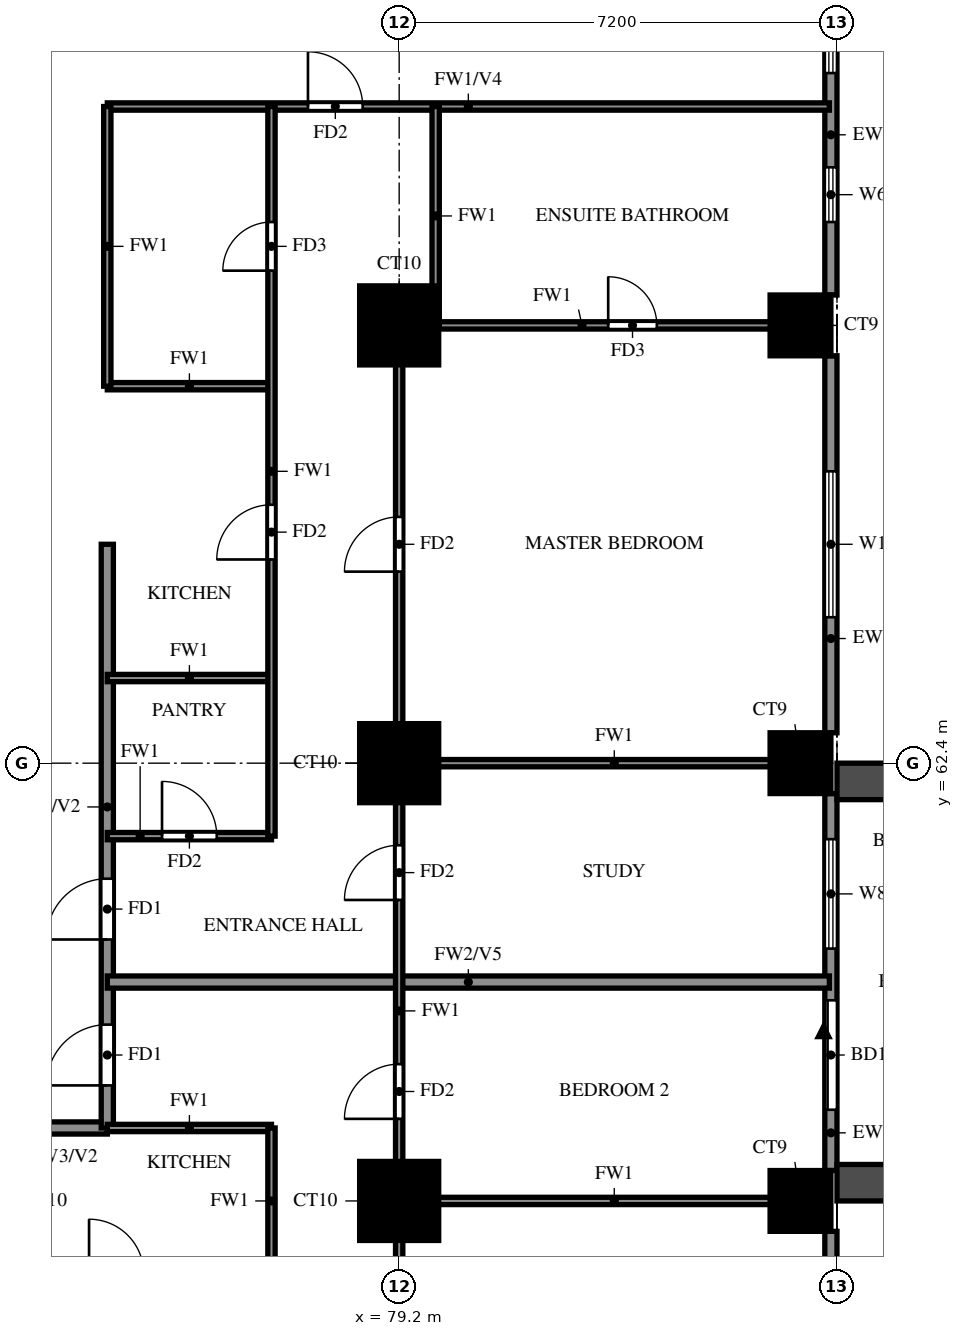
"""IFC4 building model, lengths in metres.
Left out: names, types, materials, properties, quantities, classifications, styles, units other than length and angle.
Written with IfcOpenShell. Run it as: python <this file> out.ifc"""

import sys

from ifc_helpers import new_model, si_unit, direction, frame, frame_2d, origin, origin_2d, place, context, subcontext, project, spatial, rectangle, extrude, source, transform, mapped, element, fill, save


model = new_model("IFC4")
c1 = context("Model", 3, precision=1e-05, world=origin(), true_north=direction((0.0, 1.0)))
c2 = subcontext(c1, "Body", "Model", "MODEL_VIEW")
j1 = project(units=[si_unit("LENGTHUNIT", "METRE"), si_unit("PLANEANGLEUNIT", "RADIAN")], contexts=[c1])
p1 = place(None, origin())
s1 = spatial("IfcSite", under=j1, at=p1, CompositionType="ELEMENT")
p2 = place(p1, origin())
s2 = spatial("IfcBuilding", under=s1, at=p2, CompositionType="ELEMENT")
p3 = place(p2, frame((0.0, 0.0, 86.5)))
s3 = spatial("IfcBuildingStorey", under=s2, at=p3, CompositionType="ELEMENT", Elevation=86.5)
m1 = source(origin(), c2, "Body", "SweptSolid", [
    extrude(rectangle(XDim=1.3, YDim=1.3, at=origin_2d()), origin(), (0.0, 0.0, 1.0), 3.18),
])
p4 = place(p3, frame((79.2, 55.2, 0.0), z_axis=(0.0, 0.0, 1.0), x_axis=(1.0, 0.0, 0.0)))
e1 = element("IfcColumn", 1, at=p4, inside=s3, PredefinedType="COLUMN", context=c2, shape_type="MappedRepresentation", body=[
    mapped(m1, transform((0.0, 0.0, 0.0))),
])
m2 = source(origin(), c2, "Body", "SweptSolid", [
    extrude(rectangle(XDim=1.0, YDim=1.0, at=origin_2d()), origin(), (0.0, 0.0, 1.0), 3.18),
])
p5 = place(p3, frame((85.8, 55.2, 0.0), z_axis=(0.0, 0.0, 1.0), x_axis=(1.0, 0.0, 0.0)))
e2 = element("IfcColumn", 2, at=p5, inside=s3, PredefinedType="COLUMN", context=c2, shape_type="MappedRepresentation", body=[
    mapped(m2, transform((0.0, 0.0, 0.0))),
])
p6 = place(p3, frame((79.2, 62.4, 0.0), z_axis=(0.0, 0.0, 1.0), x_axis=(1.0, 0.0, 0.0)))
e3 = element("IfcColumn", 3, at=p6, inside=s3, PredefinedType="COLUMN", context=c2, shape_type="MappedRepresentation", body=[
    mapped(m1, transform((0.0, 0.0, 0.0))),
])
p7 = place(p3, frame((85.8, 62.4, 0.0), z_axis=(0.0, 0.0, 1.0), x_axis=(1.0, 0.0, 0.0)))
e4 = element("IfcColumn", 4, at=p7, inside=s3, PredefinedType="COLUMN", context=c2, shape_type="MappedRepresentation", body=[
    mapped(m2, transform((0.0, 0.0, 0.0))),
])
p8 = place(p3, frame((79.2, 69.6, 0.0), z_axis=(0.0, 0.0, 1.0), x_axis=(1.0, 0.0, 0.0)))
e5 = element("IfcColumn", 5, at=p8, inside=s3, PredefinedType="COLUMN", context=c2, shape_type="MappedRepresentation", body=[
    mapped(m1, transform((0.0, 0.0, 0.0))),
])
p9 = place(p3, frame((85.8, 69.6, 0.0), z_axis=(0.0, 0.0, 1.0), x_axis=(1.0, 0.0, 0.0)))
e6 = element("IfcColumn", 6, at=p9, inside=s3, PredefinedType="COLUMN", context=c2, shape_type="MappedRepresentation", body=[
    mapped(m2, transform((0.0, 0.0, 0.0))),
])
p10 = place(p3, frame((86.3, 48.5, 0.0), z_axis=(0.0, 0.0, 1.0), x_axis=(0.0, 1.0, 0.0)))
e7 = element("IfcWall", 7, at=p10, inside=s3, PredefinedType="SOLIDWALL", context=c2, shape_type="SweptSolid", body=[
    extrude(rectangle(XDim=6.2, YDim=0.2, at=frame_2d((3.1, 0.0))), origin(), (0.0, 0.0, 1.0), 3.18),
])
p11 = place(p10, frame((1.9, 0.0, 0.6)))
e8 = element("IfcOpeningElement", 8, at=p11, cuts=e7, PredefinedType="OPENING", context=c2, shape_type="SweptSolid", body=[
    extrude(rectangle(XDim=2.4, YDim=2.4, at=frame_2d((1.2, 1.2))), frame((0.0, 0.11, 0.0), z_axis=(0.0, -1.0, 0.0), x_axis=(1.0, 0.0, 0.0)), (0.0, 0.0, 1.0), 0.22),
])
p12 = place(p3, frame((86.3, 55.7, 0.0), z_axis=(0.0, 0.0, 1.0), x_axis=(0.0, 1.0, 0.0)))
e9 = element("IfcWall", 9, at=p12, inside=s3, PredefinedType="SOLIDWALL", context=c2, shape_type="SweptSolid", body=[
    extrude(rectangle(XDim=6.2, YDim=0.2, at=frame_2d((3.1, 0.0))), origin(), (0.0, 0.0, 1.0), 3.18),
])
p13 = place(p12, frame((1.0, 0.0, 0.0)))
e10 = element("IfcOpeningElement", 10, at=p13, cuts=e9, PredefinedType="OPENING", context=c2, shape_type="SweptSolid", body=[
    extrude(rectangle(XDim=1.8, YDim=2.4, at=frame_2d((0.9, 1.2))), frame((0.0, 0.11, 0.0), z_axis=(0.0, -1.0, 0.0), x_axis=(1.0, 0.0, 0.0)), (0.0, 0.0, 1.0), 0.22),
])
p14 = place(p12, frame((3.65, 0.0, 0.6)))
e11 = element("IfcOpeningElement", 11, at=p14, cuts=e9, PredefinedType="OPENING", context=c2, shape_type="SweptSolid", body=[
    extrude(rectangle(XDim=1.8, YDim=2.4, at=frame_2d((0.9, 1.2))), frame((0.0, 0.11, 0.0), z_axis=(0.0, -1.0, 0.0), x_axis=(1.0, 0.0, 0.0)), (0.0, 0.0, 1.0), 0.22),
])
p15 = place(p3, frame((86.3, 62.9, 0.0), z_axis=(0.0, 0.0, 1.0), x_axis=(0.0, 1.0, 0.0)))
e12 = element("IfcWall", 12, at=p15, inside=s3, PredefinedType="SOLIDWALL", context=c2, shape_type="SweptSolid", body=[
    extrude(rectangle(XDim=6.2, YDim=0.2, at=frame_2d((3.1, 0.0))), origin(), (0.0, 0.0, 1.0), 3.18),
])
p16 = place(p15, frame((1.9, 0.0, 0.6)))
e13 = element("IfcOpeningElement", 13, at=p16, cuts=e12, PredefinedType="OPENING", context=c2, shape_type="SweptSolid", body=[
    extrude(rectangle(XDim=2.4, YDim=2.4, at=frame_2d((1.2, 1.2))), frame((0.0, 0.11, 0.0), z_axis=(0.0, -1.0, 0.0), x_axis=(1.0, 0.0, 0.0)), (0.0, 0.0, 1.0), 0.22),
])
p17 = place(p3, frame((86.3, 70.1, 0.0), z_axis=(0.0, 0.0, 1.0), x_axis=(0.0, 1.0, 0.0)))
e14 = element("IfcWall", 14, at=p17, inside=s3, PredefinedType="SOLIDWALL", context=c2, shape_type="SweptSolid", body=[
    extrude(rectangle(XDim=6.2, YDim=0.2, at=frame_2d((3.1, 0.0))), origin(), (0.0, 0.0, 1.0), 3.18),
])
p18 = place(p17, frame((1.2, 0.0, 1.5)))
e15 = element("IfcOpeningElement", 15, at=p18, cuts=e14, PredefinedType="OPENING", context=c2, shape_type="SweptSolid", body=[
    extrude(rectangle(XDim=0.9, YDim=0.9, at=frame_2d((0.45, 0.45))), frame((0.0, 0.11, 0.0), z_axis=(0.0, -1.0, 0.0), x_axis=(1.0, 0.0, 0.0)), (0.0, 0.0, 1.0), 0.22),
])
p19 = place(p17, frame((3.65, 0.0, 0.6)))
e16 = element("IfcOpeningElement", 16, at=p19, cuts=e14, PredefinedType="OPENING", context=c2, shape_type="SweptSolid", body=[
    extrude(rectangle(XDim=1.8, YDim=2.4, at=frame_2d((0.9, 1.2))), frame((0.0, 0.11, 0.0), z_axis=(0.0, -1.0, 0.0), x_axis=(1.0, 0.0, 0.0)), (0.0, 0.0, 1.0), 0.22),
])
for number, where, z_axis, x_axis in (
    (17, (86.4, 55.5, 0.0), (0.0, 0.0, 1.0), (1.0, 0.0, 0.0)),
    (18, (86.4, 62.1, 0.0), (0.0, 0.0, 1.0), (1.0, 0.0, 0.0)),
):
    element("IfcWall", number, at=place(p3, frame(where, z_axis=z_axis, x_axis=x_axis)), inside=s3, PredefinedType="SOLIDWALL", context=c2, shape_type="SweptSolid", body=[
        extrude(rectangle(XDim=2.7, YDim=0.6, at=frame_2d((1.35, 0.0))), origin(), (0.0, 0.0, 1.0), 2.85),
    ])
p20 = place(p3, frame((72.0, 56.4, 0.0), z_axis=(0.0, 0.0, 1.0), x_axis=(1.0, 0.0, 0.0)))
e19 = element("IfcWall", 19, at=p20, inside=s3, PredefinedType="SOLIDWALL", context=c2, shape_type="SweptSolid", body=[
    extrude(rectangle(XDim=2.4, YDim=0.2, at=frame_2d((1.2, 0.0))), origin(), (0.0, 0.0, 1.0), 3.18),
])
p21 = place(p3, frame((74.4, 56.4, 0.0), z_axis=(0.0, 0.0, 1.0), x_axis=(0.0, 1.0, 0.0)))
e20 = element("IfcWall", 20, at=p21, inside=s3, PredefinedType="SOLIDWALL", context=c2, shape_type="SweptSolid", body=[
    extrude(rectangle(XDim=9.6, YDim=0.2, at=frame_2d((4.8, 0.0))), origin(), (0.0, 0.0, 1.0), 3.18),
])
p22 = place(p21, frame((0.7, 0.0, 0.0)))
e21 = element("IfcOpeningElement", 21, at=p22, cuts=e20, PredefinedType="OPENING", context=c2, shape_type="SweptSolid", body=[
    extrude(rectangle(XDim=1.0, YDim=2.1, at=frame_2d((0.5, 1.05))), frame((0.0, 0.11, 0.0), z_axis=(0.0, -1.0, 0.0), x_axis=(1.0, 0.0, 0.0)), (0.0, 0.0, 1.0), 0.22),
])
p23 = place(p21, frame((3.1, 0.0, 0.0)))
e22 = element("IfcOpeningElement", 22, at=p23, cuts=e20, PredefinedType="OPENING", context=c2, shape_type="SweptSolid", body=[
    extrude(rectangle(XDim=1.0, YDim=2.1, at=frame_2d((0.5, 1.05))), frame((0.0, 0.11, 0.0), z_axis=(0.0, -1.0, 0.0), x_axis=(1.0, 0.0, 0.0)), (0.0, 0.0, 1.0), 0.22),
])
p24 = place(p3, frame((74.4, 58.8, 0.0), z_axis=(0.0, 0.0, 1.0), x_axis=(1.0, 0.0, 0.0)))
e23 = element("IfcWall", 23, at=p24, inside=s3, PredefinedType="SOLIDWALL", context=c2, shape_type="SweptSolid", body=[
    extrude(rectangle(XDim=11.875, YDim=0.2, at=frame_2d((5.938, 0.0))), origin(), (0.0, 0.0, 1.0), 2.28),
])
p25 = place(p3, frame((79.2, 55.2, 0.0), z_axis=(0.0, 0.0, 1.0), x_axis=(1.0, 0.0, 0.0)))
e24 = element("IfcWall", 24, at=p25, inside=s3, PredefinedType="PARTITIONING", context=c2, shape_type="SweptSolid", body=[
    extrude(rectangle(XDim=7.075, YDim=0.12, at=frame_2d((3.538, 0.0))), origin(), (0.0, 0.0, 1.0), 3.18),
])
p26 = place(p3, frame((74.4, 56.4, 0.0), z_axis=(0.0, 0.0, 1.0), x_axis=(1.0, 0.0, 0.0)))
e25 = element("IfcWall", 25, at=p26, inside=s3, PredefinedType="PARTITIONING", context=c2, shape_type="SweptSolid", body=[
    extrude(rectangle(XDim=2.7, YDim=0.12, at=frame_2d((1.35, 0.0))), origin(), (0.0, 0.0, 1.0), 3.18),
])
p27 = place(p3, frame((74.4, 61.2, 0.0), z_axis=(0.0, 0.0, 1.0), x_axis=(1.0, 0.0, 0.0)))
e26 = element("IfcWall", 26, at=p27, inside=s3, PredefinedType="PARTITIONING", context=c2, shape_type="SweptSolid", body=[
    extrude(rectangle(XDim=2.7, YDim=0.12, at=frame_2d((1.35, 0.0))), origin(), (0.0, 0.0, 1.0), 3.18),
])
p28 = place(p27, frame((0.9, 0.0, 0.0)))
e27 = element("IfcOpeningElement", 27, at=p28, cuts=e26, PredefinedType="OPENING", context=c2, shape_type="SweptSolid", body=[
    extrude(rectangle(XDim=0.9, YDim=2.1, at=frame_2d((0.45, 1.05))), frame((0.0, 0.07, 0.0), z_axis=(0.0, -1.0, 0.0), x_axis=(1.0, 0.0, 0.0)), (0.0, 0.0, 1.0), 0.14),
])
p29 = place(p3, frame((79.2, 62.4, 0.0), z_axis=(0.0, 0.0, 1.0), x_axis=(1.0, 0.0, 0.0)))
e28 = element("IfcWall", 28, at=p29, inside=s3, PredefinedType="PARTITIONING", context=c2, shape_type="SweptSolid", body=[
    extrude(rectangle(XDim=7.075, YDim=0.12, at=frame_2d((3.538, 0.0))), origin(), (0.0, 0.0, 1.0), 3.18),
])
for number, where, z_axis, x_axis in (
    (29, (74.4, 63.8, 0.0), (0.0, 0.0, 1.0), (1.0, 0.0, 0.0)),
    (30, (74.4, 68.6, 0.0), (0.0, 0.0, 1.0), (1.0, 0.0, 0.0)),
):
    element("IfcWall", number, at=place(p3, frame(where, z_axis=z_axis, x_axis=x_axis)), inside=s3, PredefinedType="PARTITIONING", context=c2, shape_type="SweptSolid", body=[
        extrude(rectangle(XDim=2.7, YDim=0.12, at=frame_2d((1.35, 0.0))), origin(), (0.0, 0.0, 1.0), 3.18),
    ])
p30 = place(p3, frame((79.2, 69.6, 0.0), z_axis=(0.0, 0.0, 1.0), x_axis=(1.0, 0.0, 0.0)))
e31 = element("IfcWall", 31, at=p30, inside=s3, PredefinedType="PARTITIONING", context=c2, shape_type="SweptSolid", body=[
    extrude(rectangle(XDim=7.075, YDim=0.12, at=frame_2d((3.538, 0.0))), origin(), (0.0, 0.0, 1.0), 3.18),
])
p31 = place(p30, frame((3.438, 0.0, 0.0)))
e32 = element("IfcOpeningElement", 32, at=p31, cuts=e31, PredefinedType="OPENING", context=c2, shape_type="SweptSolid", body=[
    extrude(rectangle(XDim=0.8, YDim=2.1, at=frame_2d((0.4, 1.05))), frame((0.0, 0.07, 0.0), z_axis=(0.0, -1.0, 0.0), x_axis=(1.0, 0.0, 0.0)), (0.0, 0.0, 1.0), 0.14),
])
p32 = place(p3, frame((74.4, 73.2, 0.0), z_axis=(0.0, 0.0, 1.0), x_axis=(1.0, 0.0, 0.0)))
e33 = element("IfcWall", 33, at=p32, inside=s3, PredefinedType="PARTITIONING", context=c2, shape_type="SweptSolid", body=[
    extrude(rectangle(XDim=11.875, YDim=0.12, at=frame_2d((5.938, 0.0))), origin(), (0.0, 0.0, 1.0), 2.28),
])
p33 = place(p32, frame((3.3, 0.0, 0.0)))
e34 = element("IfcOpeningElement", 34, at=p33, cuts=e33, PredefinedType="OPENING", context=c2, shape_type="SweptSolid", body=[
    extrude(rectangle(XDim=0.9, YDim=2.1, at=frame_2d((0.45, 1.05))), frame((0.0, 0.07, 0.0), z_axis=(0.0, -1.0, 0.0), x_axis=(1.0, 0.0, 0.0)), (0.0, 0.0, 1.0), 0.14),
])
p34 = place(p3, frame((74.4, 68.6, 0.0), z_axis=(0.0, 0.0, 1.0), x_axis=(0.0, 1.0, 0.0)))
e35 = element("IfcWall", 35, at=p34, inside=s3, PredefinedType="PARTITIONING", context=c2, shape_type="SweptSolid", body=[
    extrude(rectangle(XDim=4.6, YDim=0.12, at=frame_2d((2.3, 0.0))), origin(), (0.0, 0.0, 1.0), 3.18),
])
p35 = place(p3, frame((77.1, 54.0, 0.0), z_axis=(0.0, 0.0, 1.0), x_axis=(0.0, 1.0, 0.0)))
e36 = element("IfcWall", 36, at=p35, inside=s3, PredefinedType="PARTITIONING", context=c2, shape_type="SweptSolid", body=[
    extrude(rectangle(XDim=2.4, YDim=0.12, at=frame_2d((1.2, 0.0))), origin(), (0.0, 0.0, 1.0), 3.18),
])
p36 = place(p3, frame((77.1, 61.2, 0.0), z_axis=(0.0, 0.0, 1.0), x_axis=(0.0, 1.0, 0.0)))
e37 = element("IfcWall", 37, at=p36, inside=s3, PredefinedType="PARTITIONING", context=c2, shape_type="SweptSolid", body=[
    extrude(rectangle(XDim=12.0, YDim=0.12, at=frame_2d((6.0, 0.0))), origin(), (0.0, 0.0, 1.0), 3.18),
])
p37 = place(p36, frame((4.55, 0.0, 0.0)))
e38 = element("IfcOpeningElement", 38, at=p37, cuts=e37, PredefinedType="OPENING", context=c2, shape_type="SweptSolid", body=[
    extrude(rectangle(XDim=0.9, YDim=2.1, at=frame_2d((0.45, 1.05))), frame((0.0, 0.07, 0.0), z_axis=(0.0, -1.0, 0.0), x_axis=(1.0, 0.0, 0.0)), (0.0, 0.0, 1.0), 0.14),
])
p38 = place(p36, frame((9.3, 0.0, 0.0)))
e39 = element("IfcOpeningElement", 39, at=p38, cuts=e37, PredefinedType="OPENING", context=c2, shape_type="SweptSolid", body=[
    extrude(rectangle(XDim=0.8, YDim=2.1, at=frame_2d((0.4, 1.05))), frame((0.0, 0.07, 0.0), z_axis=(0.0, -1.0, 0.0), x_axis=(1.0, 0.0, 0.0)), (0.0, 0.0, 1.0), 0.14),
])
p39 = place(p3, frame((79.2, 48.125, 0.0), z_axis=(0.0, 0.0, 1.0), x_axis=(0.0, 1.0, 0.0)))
e40 = element("IfcWall", 40, at=p39, inside=s3, PredefinedType="PARTITIONING", context=c2, shape_type="SweptSolid", body=[
    extrude(rectangle(XDim=21.475, YDim=0.12, at=frame_2d((10.738, 0.0))), origin(), (0.0, 0.0, 1.0), 3.18),
])
p40 = place(p39, frame((2.788, 0.0, 0.0)))
e41 = element("IfcOpeningElement", 41, at=p40, cuts=e40, PredefinedType="OPENING", context=c2, shape_type="SweptSolid", body=[
    extrude(rectangle(XDim=1.5, YDim=2.1, at=frame_2d((0.75, 1.05))), frame((0.0, 0.07, 0.0), z_axis=(0.0, -1.0, 0.0), x_axis=(1.0, 0.0, 0.0)), (0.0, 0.0, 1.0), 0.14),
])
p41 = place(p39, frame((8.425, 0.0, 0.0)))
e42 = element("IfcOpeningElement", 42, at=p41, cuts=e40, PredefinedType="OPENING", context=c2, shape_type="SweptSolid", body=[
    extrude(rectangle(XDim=0.9, YDim=2.1, at=frame_2d((0.45, 1.05))), frame((0.0, 0.07, 0.0), z_axis=(0.0, -1.0, 0.0), x_axis=(1.0, 0.0, 0.0)), (0.0, 0.0, 1.0), 0.14),
])
p42 = place(p39, frame((12.025, 0.0, 0.0)))
e43 = element("IfcOpeningElement", 43, at=p42, cuts=e40, PredefinedType="OPENING", context=c2, shape_type="SweptSolid", body=[
    extrude(rectangle(XDim=0.9, YDim=2.1, at=frame_2d((0.45, 1.05))), frame((0.0, 0.07, 0.0), z_axis=(0.0, -1.0, 0.0), x_axis=(1.0, 0.0, 0.0)), (0.0, 0.0, 1.0), 0.14),
])
p43 = place(p39, frame((17.425, 0.0, 0.0)))
e44 = element("IfcOpeningElement", 44, at=p43, cuts=e40, PredefinedType="OPENING", context=c2, shape_type="SweptSolid", body=[
    extrude(rectangle(XDim=0.9, YDim=2.1, at=frame_2d((0.45, 1.05))), frame((0.0, 0.07, 0.0), z_axis=(0.0, -1.0, 0.0), x_axis=(1.0, 0.0, 0.0)), (0.0, 0.0, 1.0), 0.14),
])
p44 = place(p3, frame((79.8, 69.6, 0.0), z_axis=(0.0, 0.0, 1.0), x_axis=(0.0, 1.0, 0.0)))
e45 = element("IfcWall", 45, at=p44, inside=s3, PredefinedType="PARTITIONING", context=c2, shape_type="SweptSolid", body=[
    extrude(rectangle(XDim=3.6, YDim=0.12, at=frame_2d((1.8, 0.0))), origin(), (0.0, 0.0, 1.0), 3.18),
])
p45 = place(p13, origin())
e46 = element("IfcDoor", 46, at=p45, inside=s3, OperationType="DOUBLE_DOOR_SLIDING", PredefinedType="DOOR", context=c2, shape_type="SweptSolid", body=[
    extrude(rectangle(XDim=1.8, YDim=2.4, at=frame_2d((0.9, 1.2))), frame((0.0, 0.025, 0.0), z_axis=(0.0, -1.0, 0.0), x_axis=(1.0, 0.0, 0.0)), (0.0, 0.0, 1.0), 0.05),
])
fill(e10, e46)
p46 = place(p14, origin())
e47 = element("IfcWindow", 47, at=p46, inside=s3, PartitioningType="DOUBLE_PANEL_VERTICAL", PredefinedType="WINDOW", context=c2, shape_type="SweptSolid", body=[
    extrude(rectangle(XDim=1.8, YDim=2.4, at=frame_2d((0.9, 1.2))), frame((0.0, 0.03, 0.0), z_axis=(0.0, -1.0, 0.0), x_axis=(1.0, 0.0, 0.0)), (0.0, 0.0, 1.0), 0.06),
])
fill(e11, e47)
p47 = place(p16, origin())
e48 = element("IfcWindow", 48, at=p47, inside=s3, PartitioningType="DOUBLE_PANEL_VERTICAL", PredefinedType="WINDOW", context=c2, shape_type="SweptSolid", body=[
    extrude(rectangle(XDim=2.4, YDim=2.4, at=frame_2d((1.2, 1.2))), frame((0.0, 0.03, 0.0), z_axis=(0.0, -1.0, 0.0), x_axis=(1.0, 0.0, 0.0)), (0.0, 0.0, 1.0), 0.06),
])
fill(e13, e48)
p48 = place(p18, origin())
e49 = element("IfcWindow", 49, at=p48, inside=s3, PartitioningType="SINGLE_PANEL", PredefinedType="WINDOW", context=c2, shape_type="SweptSolid", body=[
    extrude(rectangle(XDim=0.9, YDim=0.9, at=frame_2d((0.45, 0.45))), frame((0.0, 0.03, 0.0), z_axis=(0.0, -1.0, 0.0), x_axis=(1.0, 0.0, 0.0)), (0.0, 0.0, 1.0), 0.06),
])
fill(e15, e49)
p49 = place(p19, origin())
e50 = element("IfcWindow", 50, at=p49, inside=s3, PartitioningType="DOUBLE_PANEL_VERTICAL", PredefinedType="WINDOW", context=c2, shape_type="SweptSolid", body=[
    extrude(rectangle(XDim=1.8, YDim=2.4, at=frame_2d((0.9, 1.2))), frame((0.0, 0.03, 0.0), z_axis=(0.0, -1.0, 0.0), x_axis=(1.0, 0.0, 0.0)), (0.0, 0.0, 1.0), 0.06),
])
fill(e16, e50)
p50 = place(p22, origin())
e51 = element("IfcDoor", 51, at=p50, inside=s3, OperationType="SINGLE_SWING_RIGHT", PredefinedType="DOOR", context=c2, shape_type="SweptSolid", body=[
    extrude(rectangle(XDim=1.0, YDim=2.1, at=frame_2d((0.5, 1.05))), frame((0.0, 0.025, 0.0), z_axis=(0.0, -1.0, 0.0), x_axis=(1.0, 0.0, 0.0)), (0.0, 0.0, 1.0), 0.05),
])
fill(e21, e51)
p51 = place(p41, origin())
e52 = element("IfcDoor", 52, at=p51, inside=s3, OperationType="SINGLE_SWING_LEFT", PredefinedType="DOOR", context=c2, shape_type="SweptSolid", body=[
    extrude(rectangle(XDim=0.9, YDim=2.1, at=frame_2d((0.45, 1.05))), frame((0.0, 0.025, 0.0), z_axis=(0.0, -1.0, 0.0), x_axis=(1.0, 0.0, 0.0)), (0.0, 0.0, 1.0), 0.05),
])
fill(e42, e52)
p52 = place(p23, origin())
e53 = element("IfcDoor", 53, at=p52, inside=s3, OperationType="SINGLE_SWING_LEFT", PredefinedType="DOOR", context=c2, shape_type="SweptSolid", body=[
    extrude(rectangle(XDim=1.0, YDim=2.1, at=frame_2d((0.5, 1.05))), frame((0.0, 0.025, 0.0), z_axis=(0.0, -1.0, 0.0), x_axis=(1.0, 0.0, 0.0)), (0.0, 0.0, 1.0), 0.05),
])
fill(e22, e53)
p53 = place(p42, origin())
e54 = element("IfcDoor", 54, at=p53, inside=s3, OperationType="SINGLE_SWING_LEFT", PredefinedType="DOOR", context=c2, shape_type="SweptSolid", body=[
    extrude(rectangle(XDim=0.9, YDim=2.1, at=frame_2d((0.45, 1.05))), frame((0.0, 0.025, 0.0), z_axis=(0.0, -1.0, 0.0), x_axis=(1.0, 0.0, 0.0)), (0.0, 0.0, 1.0), 0.05),
])
fill(e43, e54)
p54 = place(p43, origin())
e55 = element("IfcDoor", 55, at=p54, inside=s3, OperationType="SINGLE_SWING_RIGHT", PredefinedType="DOOR", context=c2, shape_type="SweptSolid", body=[
    extrude(rectangle(XDim=0.9, YDim=2.1, at=frame_2d((0.45, 1.05))), frame((0.0, 0.025, 0.0), z_axis=(0.0, -1.0, 0.0), x_axis=(1.0, 0.0, 0.0)), (0.0, 0.0, 1.0), 0.05),
])
fill(e44, e55)
p55 = place(p31, origin())
e56 = element("IfcDoor", 56, at=p55, inside=s3, OperationType="SINGLE_SWING_LEFT", PredefinedType="DOOR", context=c2, shape_type="SweptSolid", body=[
    extrude(rectangle(XDim=0.8, YDim=2.1, at=frame_2d((0.4, 1.05))), frame((0.0, 0.025, 0.0), z_axis=(0.0, -1.0, 0.0), x_axis=(1.0, 0.0, 0.0)), (0.0, 0.0, 1.0), 0.05),
])
fill(e32, e56)
p56 = place(p33, origin())
e57 = element("IfcDoor", 57, at=p56, inside=s3, OperationType="SINGLE_SWING_LEFT", PredefinedType="DOOR", context=c2, shape_type="SweptSolid", body=[
    extrude(rectangle(XDim=0.9, YDim=2.1, at=frame_2d((0.45, 1.05))), frame((0.0, 0.025, 0.0), z_axis=(0.0, -1.0, 0.0), x_axis=(1.0, 0.0, 0.0)), (0.0, 0.0, 1.0), 0.05),
])
fill(e34, e57)
p57 = place(p28, origin())
e58 = element("IfcDoor", 58, at=p57, inside=s3, OperationType="SINGLE_SWING_RIGHT", PredefinedType="DOOR", context=c2, shape_type="SweptSolid", body=[
    extrude(rectangle(XDim=0.9, YDim=2.1, at=frame_2d((0.45, 1.05))), frame((0.0, 0.025, 0.0), z_axis=(0.0, -1.0, 0.0), x_axis=(1.0, 0.0, 0.0)), (0.0, 0.0, 1.0), 0.05),
])
fill(e27, e58)
p58 = place(p37, origin())
e59 = element("IfcDoor", 59, at=p58, inside=s3, OperationType="SINGLE_SWING_LEFT", PredefinedType="DOOR", context=c2, shape_type="SweptSolid", body=[
    extrude(rectangle(XDim=0.9, YDim=2.1, at=frame_2d((0.45, 1.05))), frame((0.0, 0.025, 0.0), z_axis=(0.0, -1.0, 0.0), x_axis=(1.0, 0.0, 0.0)), (0.0, 0.0, 1.0), 0.05),
])
fill(e38, e59)
p59 = place(p38, origin())
e60 = element("IfcDoor", 60, at=p59, inside=s3, OperationType="SINGLE_SWING_LEFT", PredefinedType="DOOR", context=c2, shape_type="SweptSolid", body=[
    extrude(rectangle(XDim=0.8, YDim=2.1, at=frame_2d((0.4, 1.05))), frame((0.0, 0.025, 0.0), z_axis=(0.0, -1.0, 0.0), x_axis=(1.0, 0.0, 0.0)), (0.0, 0.0, 1.0), 0.05),
])
fill(e39, e60)
save(model, sys.argv[1])
